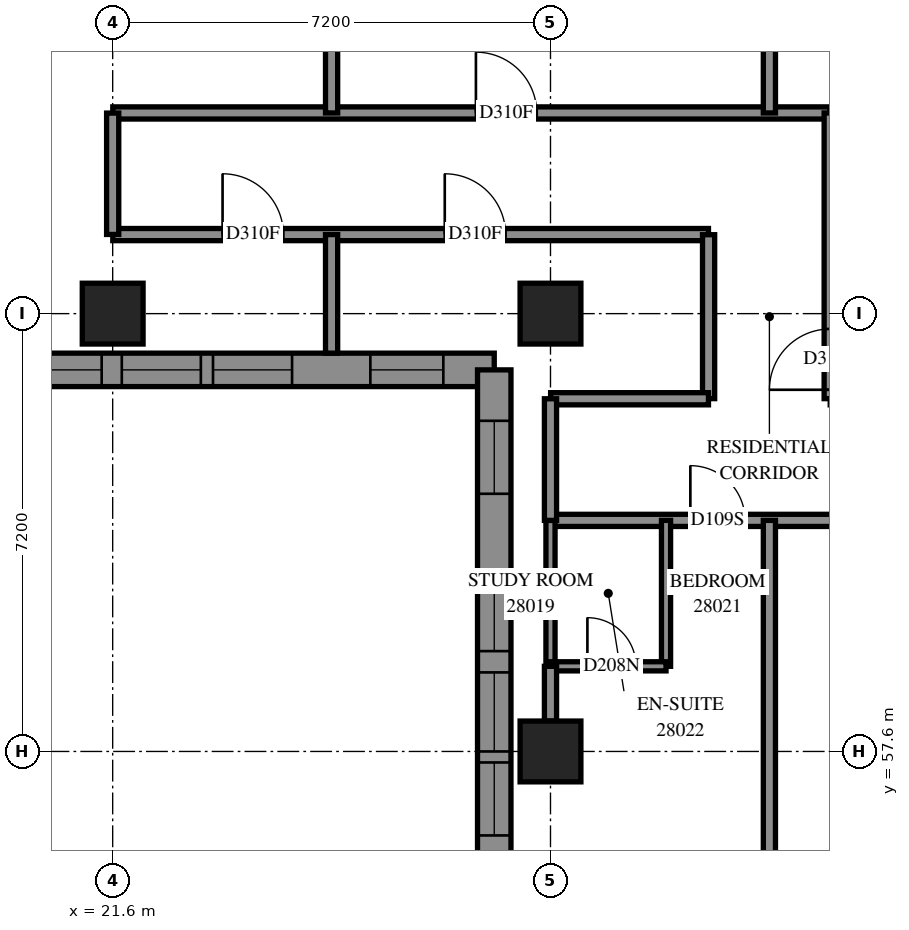
"""IFC4 building model, lengths in metres.
Left out: names, types, materials, properties, quantities, classifications, styles, units other than length and angle.
Written with IfcOpenShell. Run it as: python <this file> out.ifc"""

import sys

from ifc_helpers import new_model, si_unit, direction, frame, frame_2d, origin, origin_2d, place, context, subcontext, project, spatial, polyline, rectangle, outline, extrude, element, fill, save


model = new_model("IFC4")
c1 = context("Model", 3, precision=1e-05, world=origin(), true_north=direction((0.0, 1.0)))
c2 = subcontext(c1, "Body", "Model", "MODEL_VIEW")
j1 = project(units=[si_unit("LENGTHUNIT", "METRE"), si_unit("PLANEANGLEUNIT", "RADIAN")], contexts=[c1])
p1 = place(None, origin())
s1 = spatial("IfcSite", under=j1, at=p1, CompositionType="ELEMENT")
p2 = place(p1, origin())
s2 = spatial("IfcBuilding", under=s1, at=p2, CompositionType="ELEMENT")
p3 = place(p2, frame((0.0, 0.0, 105.0)))
s3 = spatial("IfcBuildingStorey", under=s2, at=p3, CompositionType="ELEMENT", Elevation=105.0)
for number, where, z_axis, x_axis in (
    (1, (21.6, 64.8, 0.0), (0.0, 0.0, 1.0), (1.0, 0.0, 0.0)),
    (2, (28.8, 57.6, 0.0), (0.0, 0.0, 1.0), (1.0, 0.0, 0.0)),
    (3, (28.8, 64.8, 0.0), (0.0, 0.0, 1.0), (1.0, 0.0, 0.0)),
):
    element("IfcColumn", number, at=place(p3, frame(where, z_axis=z_axis, x_axis=x_axis)), inside=s3, PredefinedType="COLUMN", context=c2, shape_type="SweptSolid", body=[
        extrude(rectangle(XDim=1.0, YDim=1.0, at=origin_2d()), origin(), (0.0, 0.0, 1.0), 3.1),
    ])
p4 = place(p3, frame((19.563, 63.875, 0.0), z_axis=(0.0, 0.0, 1.0), x_axis=(1.0, 0.0, 0.0)))
e4 = element("IfcWall", 4, at=p4, inside=s3, PredefinedType="SOLIDWALL", context=c2, shape_type="SweptSolid", body=[
    extrude(outline(polyline([(-0.275, -0.275), (8.037, -0.275), (8.587, 0.275), (0.275, 0.275), (-0.275, -0.275)])), origin(), (0.0, 0.0, 1.0), 3.1),
])
p5 = place(p4, frame((2.187, 0.0, 0.5)))
e5 = element("IfcOpeningElement", 5, at=p5, cuts=e4, PredefinedType="OPENING", context=c2, shape_type="SweptSolid", body=[
    extrude(rectangle(XDim=1.3, YDim=2.45, at=frame_2d((0.65, 1.225))), frame((0.0, 0.285, 0.0), z_axis=(0.0, -1.0, 0.0), x_axis=(1.0, 0.0, 0.0)), (0.0, 0.0, 1.0), 0.57),
])
p6 = place(p4, frame((3.687, 0.0, 0.5)))
e6 = element("IfcOpeningElement", 6, at=p6, cuts=e4, PredefinedType="OPENING", context=c2, shape_type="SweptSolid", body=[
    extrude(rectangle(XDim=1.3, YDim=2.45, at=frame_2d((0.65, 1.225))), frame((0.0, 0.285, 0.0), z_axis=(0.0, -1.0, 0.0), x_axis=(1.0, 0.0, 0.0)), (0.0, 0.0, 1.0), 0.57),
])
p7 = place(p4, frame((0.656, 0.0, 0.5)))
e7 = element("IfcOpeningElement", 7, at=p7, cuts=e4, PredefinedType="OPENING", context=c2, shape_type="SweptSolid", body=[
    extrude(rectangle(XDim=1.2, YDim=2.45, at=frame_2d((0.6, 1.225))), frame((0.0, 0.285, 0.0), z_axis=(0.0, -1.0, 0.0), x_axis=(1.0, 0.0, 0.0)), (0.0, 0.0, 1.0), 0.57),
])
p8 = place(p4, frame((6.274, 0.0, 0.5)))
e8 = element("IfcOpeningElement", 8, at=p8, cuts=e4, PredefinedType="OPENING", context=c2, shape_type="SweptSolid", body=[
    extrude(rectangle(XDim=1.2, YDim=2.45, at=frame_2d((0.6, 1.225))), frame((0.0, 0.285, 0.0), z_axis=(0.0, -1.0, 0.0), x_axis=(1.0, 0.0, 0.0)), (0.0, 0.0, 1.0), 0.57),
])
p9 = place(p3, frame((27.875, 63.875, 0.0), z_axis=(0.0, 0.0, 1.0), x_axis=(0.0, -1.0, 0.0)))
e9 = element("IfcWall", 9, at=p9, inside=s3, PredefinedType="SOLIDWALL", context=c2, shape_type="SweptSolid", body=[
    extrude(outline(polyline([(0.275, -0.275), (8.587, -0.275), (8.037, 0.275), (-0.275, 0.275), (0.275, -0.275)])), origin(), (0.0, 0.0, 1.0), 3.1),
])
p10 = place(p9, frame((3.325, 0.0, 0.5)))
e10 = element("IfcOpeningElement", 10, at=p10, cuts=e9, PredefinedType="OPENING", context=c2, shape_type="SweptSolid", body=[
    extrude(rectangle(XDim=1.3, YDim=2.45, at=frame_2d((0.65, 1.225))), frame((0.0, 0.285, 0.0), z_axis=(0.0, -1.0, 0.0), x_axis=(1.0, 0.0, 0.0)), (0.0, 0.0, 1.0), 0.57),
])
p11 = place(p9, frame((4.975, 0.0, 0.5)))
e11 = element("IfcOpeningElement", 11, at=p11, cuts=e9, PredefinedType="OPENING", context=c2, shape_type="SweptSolid", body=[
    extrude(rectangle(XDim=1.3, YDim=2.45, at=frame_2d((0.65, 1.225))), frame((0.0, 0.285, 0.0), z_axis=(0.0, -1.0, 0.0), x_axis=(1.0, 0.0, 0.0)), (0.0, 0.0, 1.0), 0.57),
])
p12 = place(p9, frame((0.838, 0.0, 0.5)))
e12 = element("IfcOpeningElement", 12, at=p12, cuts=e9, PredefinedType="OPENING", context=c2, shape_type="SweptSolid", body=[
    extrude(rectangle(XDim=1.2, YDim=2.45, at=frame_2d((0.6, 1.225))), frame((0.0, 0.285, 0.0), z_axis=(0.0, -1.0, 0.0), x_axis=(1.0, 0.0, 0.0)), (0.0, 0.0, 1.0), 0.57),
])
p13 = place(p9, frame((6.456, 0.0, 0.5)))
e13 = element("IfcOpeningElement", 13, at=p13, cuts=e9, PredefinedType="OPENING", context=c2, shape_type="SweptSolid", body=[
    extrude(rectangle(XDim=1.2, YDim=2.45, at=frame_2d((0.6, 1.225))), frame((0.0, 0.285, 0.0), z_axis=(0.0, -1.0, 0.0), x_axis=(1.0, 0.0, 0.0)), (0.0, 0.0, 1.0), 0.57),
])
p14 = place(p3, frame((28.8, 61.4, 0.0), z_axis=(0.0, 0.0, 1.0), x_axis=(1.0, 0.0, 0.0)))
e14 = element("IfcWall", 14, at=p14, inside=s3, PredefinedType="PARTITIONING", context=c2, shape_type="SweptSolid", body=[
    extrude(rectangle(XDim=24.2, YDim=0.2, at=frame_2d((12.1, 0.0))), origin(), (0.0, 0.0, 1.0), 3.1),
])
p15 = place(p14, frame((2.3, 0.0, 0.0)))
e15 = element("IfcOpeningElement", 15, at=p15, cuts=e14, PredefinedType="OPENING", context=c2, shape_type="SweptSolid", body=[
    extrude(rectangle(XDim=0.9, YDim=2.1, at=frame_2d((0.45, 1.05))), frame((0.0, 0.11, 0.0), z_axis=(0.0, -1.0, 0.0), x_axis=(1.0, 0.0, 0.0)), (0.0, 0.0, 1.0), 0.22),
])
p16 = place(p14, frame((5.901, 0.0, 0.0)))
e16 = element("IfcOpeningElement", 16, at=p16, cuts=e14, PredefinedType="OPENING", context=c2, shape_type="SweptSolid", body=[
    extrude(rectangle(XDim=0.9, YDim=2.1, at=frame_2d((0.45, 1.05))), frame((0.0, 0.11, 0.0), z_axis=(0.0, -1.0, 0.0), x_axis=(1.0, 0.0, 0.0)), (0.0, 0.0, 1.0), 0.22),
])
p17 = place(p14, frame((11.307, 0.0, 0.0)))
e17 = element("IfcOpeningElement", 17, at=p17, cuts=e14, PredefinedType="OPENING", context=c2, shape_type="SweptSolid", body=[
    extrude(rectangle(XDim=1.0, YDim=2.1, at=frame_2d((0.5, 1.05))), frame((0.0, 0.11, 0.0), z_axis=(0.0, -1.0, 0.0), x_axis=(1.0, 0.0, 0.0)), (0.0, 0.0, 1.0), 0.22),
])
p18 = place(p14, frame((16.7, 0.0, 0.0)))
e18 = element("IfcOpeningElement", 18, at=p18, cuts=e14, PredefinedType="OPENING", context=c2, shape_type="SweptSolid", body=[
    extrude(rectangle(XDim=0.9, YDim=2.1, at=frame_2d((0.45, 1.05))), frame((0.0, 0.11, 0.0), z_axis=(0.0, -1.0, 0.0), x_axis=(1.0, 0.0, 0.0)), (0.0, 0.0, 1.0), 0.22),
])
p19 = place(p14, frame((18.508, 0.0, 0.0)))
e19 = element("IfcOpeningElement", 19, at=p19, cuts=e14, PredefinedType="OPENING", context=c2, shape_type="SweptSolid", body=[
    extrude(rectangle(XDim=1.0, YDim=2.1, at=frame_2d((0.5, 1.05))), frame((0.0, 0.11, 0.0), z_axis=(0.0, -1.0, 0.0), x_axis=(1.0, 0.0, 0.0)), (0.0, 0.0, 1.0), 0.22),
])
p20 = place(p14, frame((23.074, 0.0, 0.0)))
e20 = element("IfcOpeningElement", 20, at=p20, cuts=e14, PredefinedType="OPENING", context=c2, shape_type="SweptSolid", body=[
    extrude(rectangle(XDim=1.0, YDim=2.1, at=frame_2d((0.5, 1.05))), frame((0.0, 0.11, 0.0), z_axis=(0.0, -1.0, 0.0), x_axis=(1.0, 0.0, 0.0)), (0.0, 0.0, 1.0), 0.22),
])
p21 = place(p3, frame((21.602, 68.1, 0.0), z_axis=(0.0, 0.0, 1.0), x_axis=(1.0, 0.0, 0.0)))
e21 = element("IfcWall", 21, at=p21, inside=s3, PredefinedType="PARTITIONING", context=c2, shape_type="SweptSolid", body=[
    extrude(rectangle(XDim=11.798, YDim=0.2, at=frame_2d((5.899, 0.0))), origin(), (0.0, 0.0, 1.0), 3.1),
])
p22 = place(p21, frame((5.972, 0.0, 0.0)))
e22 = element("IfcOpeningElement", 22, at=p22, cuts=e21, PredefinedType="OPENING", context=c2, shape_type="SweptSolid", body=[
    extrude(rectangle(XDim=1.0, YDim=2.1, at=frame_2d((0.5, 1.05))), frame((0.0, 0.11, 0.0), z_axis=(0.0, -1.0, 0.0), x_axis=(1.0, 0.0, 0.0)), (0.0, 0.0, 1.0), 0.22),
])
p23 = place(p3, frame((21.602, 66.1, 0.0), z_axis=(0.0, 0.0, 1.0), x_axis=(1.0, 0.0, 0.0)))
e23 = element("IfcWall", 23, at=p23, inside=s3, PredefinedType="PARTITIONING", context=c2, shape_type="SweptSolid", body=[
    extrude(rectangle(XDim=9.796, YDim=0.2, at=frame_2d((4.898, 0.0))), origin(), (0.0, 0.0, 1.0), 3.1),
])
p24 = place(p23, frame((1.805, 0.0, 0.0)))
e24 = element("IfcOpeningElement", 24, at=p24, cuts=e23, PredefinedType="OPENING", context=c2, shape_type="SweptSolid", body=[
    extrude(rectangle(XDim=1.0, YDim=2.1, at=frame_2d((0.5, 1.05))), frame((0.0, 0.11, 0.0), z_axis=(0.0, -1.0, 0.0), x_axis=(1.0, 0.0, 0.0)), (0.0, 0.0, 1.0), 0.22),
])
p25 = place(p23, frame((5.459, 0.0, 0.0)))
e25 = element("IfcOpeningElement", 25, at=p25, cuts=e23, PredefinedType="OPENING", context=c2, shape_type="SweptSolid", body=[
    extrude(rectangle(XDim=1.0, YDim=2.1, at=frame_2d((0.5, 1.05))), frame((0.0, 0.11, 0.0), z_axis=(0.0, -1.0, 0.0), x_axis=(1.0, 0.0, 0.0)), (0.0, 0.0, 1.0), 0.22),
])
p26 = place(p3, frame((32.4, 55.838, 0.0), z_axis=(0.0, 0.0, 1.0), x_axis=(0.0, 1.0, 0.0)))
e26 = element("IfcWall", 26, at=p26, inside=s3, PredefinedType="PARTITIONING", context=c2, shape_type="SweptSolid", body=[
    extrude(rectangle(XDim=5.562, YDim=0.2, at=frame_2d((2.781, 0.0))), origin(), (0.0, 0.0, 1.0), 3.1),
])
p27 = place(p3, frame((25.2, 68.1, 0.0), z_axis=(0.0, 0.0, 1.0), x_axis=(0.0, 1.0, 0.0)))
e27 = element("IfcWall", 27, at=p27, inside=s3, PredefinedType="PARTITIONING", context=c2, shape_type="SweptSolid", body=[
    extrude(rectangle(XDim=4.829, YDim=0.2, at=frame_2d((2.414, 0.0))), origin(), (0.0, 0.0, 1.0), 3.1),
])
p28 = place(p3, frame((32.4, 68.1, 0.0), z_axis=(0.0, 0.0, 1.0), x_axis=(0.0, 1.0, 0.0)))
e28 = element("IfcWall", 28, at=p28, inside=s3, PredefinedType="PARTITIONING", context=c2, shape_type="SweptSolid", body=[
    extrude(rectangle(XDim=4.774, YDim=0.2, at=frame_2d((2.387, 0.0))), origin(), (0.0, 0.0, 1.0), 3.1),
])
p29 = place(p3, frame((33.4, 63.402, 0.0), z_axis=(0.0, 0.0, 1.0), x_axis=(0.0, 1.0, 0.0)))
e29 = element("IfcWall", 29, at=p29, inside=s3, PredefinedType="PARTITIONING", context=c2, shape_type="SweptSolid", body=[
    extrude(rectangle(XDim=4.698, YDim=0.2, at=frame_2d((2.349, 0.0))), origin(), (0.0, 0.0, 1.0), 3.1),
])
p30 = place(p29, frame((0.146, 0.0, 0.0)))
e30 = element("IfcOpeningElement", 30, at=p30, cuts=e29, PredefinedType="OPENING", context=c2, shape_type="SweptSolid", body=[
    extrude(rectangle(XDim=1.0, YDim=2.1, at=frame_2d((0.5, 1.05))), frame((0.0, 0.11, 0.0), z_axis=(0.0, -1.0, 0.0), x_axis=(1.0, 0.0, 0.0)), (0.0, 0.0, 1.0), 0.22),
])
p31 = place(p3, frame((31.4, 63.402, 0.0), z_axis=(0.0, 0.0, 1.0), x_axis=(0.0, 1.0, 0.0)))
e31 = element("IfcWall", 31, at=p31, inside=s3, PredefinedType="PARTITIONING", context=c2, shape_type="SweptSolid", body=[
    extrude(rectangle(XDim=2.696, YDim=0.2, at=frame_2d((1.348, 0.0))), origin(), (0.0, 0.0, 1.0), 3.1),
])
p32 = place(p3, frame((28.802, 63.4, 0.0), z_axis=(0.0, 0.0, 1.0), x_axis=(1.0, 0.0, 0.0)))
e32 = element("IfcWall", 32, at=p32, inside=s3, PredefinedType="PARTITIONING", context=c2, shape_type="SweptSolid", body=[
    extrude(rectangle(XDim=2.596, YDim=0.2, at=frame_2d((1.298, 0.0))), origin(), (0.0, 0.0, 1.0), 3.1),
])
p33 = place(p3, frame((30.7, 59.0, 0.0), z_axis=(0.0, 0.0, 1.0), x_axis=(0.0, 1.0, 0.0)))
e33 = element("IfcWall", 33, at=p33, inside=s3, PredefinedType="PARTITIONING", context=c2, shape_type="SweptSolid", body=[
    extrude(rectangle(XDim=2.4, YDim=0.15, at=frame_2d((1.2, 0.0))), origin(), (0.0, 0.0, 1.0), 3.1),
])
p34 = place(p3, frame((28.8, 59.0, 0.0), z_axis=(0.0, 0.0, 1.0), x_axis=(0.0, 1.0, 0.0)))
e34 = element("IfcWall", 34, at=p34, inside=s3, PredefinedType="PARTITIONING", context=c2, shape_type="SweptSolid", body=[
    extrude(rectangle(XDim=2.4, YDim=0.15, at=frame_2d((1.2, 0.0))), origin(), (0.0, 0.0, 1.0), 2.6),
])
p35 = place(p3, frame((28.8, 61.4, 0.0), z_axis=(0.0, 0.0, 1.0), x_axis=(0.0, 1.0, 0.0)))
e35 = element("IfcWall", 35, at=p35, inside=s3, PredefinedType="PARTITIONING", context=c2, shape_type="SweptSolid", body=[
    extrude(rectangle(XDim=2.0, YDim=0.2, at=frame_2d((1.0, 0.0))), origin(), (0.0, 0.0, 1.0), 2.6),
])
p36 = place(p3, frame((21.6, 66.102, 0.0), z_axis=(0.0, 0.0, 1.0), x_axis=(0.0, 1.0, 0.0)))
e36 = element("IfcWall", 36, at=p36, inside=s3, PredefinedType="PARTITIONING", context=c2, shape_type="SweptSolid", body=[
    extrude(rectangle(XDim=1.996, YDim=0.2, at=frame_2d((0.998, 0.0))), origin(), (0.0, 0.0, 1.0), 2.6),
])
p37 = place(p3, frame((28.8, 59.0, 0.0), z_axis=(0.0, 0.0, 1.0), x_axis=(1.0, 0.0, 0.0)))
e37 = element("IfcWall", 37, at=p37, inside=s3, PredefinedType="PARTITIONING", context=c2, shape_type="SweptSolid", body=[
    extrude(rectangle(XDim=1.9, YDim=0.15, at=frame_2d((0.95, 0.0))), origin(), (0.0, 0.0, 1.0), 3.1),
])
p38 = place(p37, frame((0.607, 0.0, 0.0)))
e38 = element("IfcOpeningElement", 38, at=p38, cuts=e37, PredefinedType="OPENING", context=c2, shape_type="SweptSolid", body=[
    extrude(rectangle(XDim=0.8, YDim=2.1, at=frame_2d((0.4, 1.05))), frame((0.0, 0.085, 0.0), z_axis=(0.0, -1.0, 0.0), x_axis=(1.0, 0.0, 0.0)), (0.0, 0.0, 1.0), 0.17),
])
p39 = place(p3, frame((25.2, 64.15, 0.0), z_axis=(0.0, 0.0, 1.0), x_axis=(0.0, 1.0, 0.0)))
e39 = element("IfcWall", 39, at=p39, inside=s3, PredefinedType="PARTITIONING", context=c2, shape_type="SweptSolid", body=[
    extrude(rectangle(XDim=1.95, YDim=0.2, at=frame_2d((0.975, 0.0))), origin(), (0.0, 0.0, 1.0), 3.1),
])
p40 = place(p3, frame((28.8, 58.1, 0.0), z_axis=(0.0, 0.0, 1.0), x_axis=(0.0, 1.0, 0.0)))
e40 = element("IfcWall", 40, at=p40, inside=s3, PredefinedType="PARTITIONING", context=c2, shape_type="SweptSolid", body=[
    extrude(rectangle(XDim=0.9, YDim=0.2, at=frame_2d((0.45, 0.0))), origin(), (0.0, 0.0, 1.0), 2.6),
])
p41 = place(p5, origin())
e41 = element("IfcWindow", 41, at=p41, inside=s3, PartitioningType="SINGLE_PANEL", PredefinedType="WINDOW", context=c2, shape_type="SweptSolid", body=[
    extrude(rectangle(XDim=1.3, YDim=2.45, at=frame_2d((0.65, 1.225))), frame((0.0, 0.155, 0.0), z_axis=(0.0, -1.0, 0.0), x_axis=(1.0, 0.0, 0.0)), (0.0, 0.0, 1.0), 0.06),
])
fill(e5, e41)
p42 = place(p6, origin())
e42 = element("IfcWindow", 42, at=p42, inside=s3, PartitioningType="SINGLE_PANEL", PredefinedType="WINDOW", context=c2, shape_type="SweptSolid", body=[
    extrude(rectangle(XDim=1.3, YDim=2.45, at=frame_2d((0.65, 1.225))), frame((0.0, 0.155, 0.0), z_axis=(0.0, -1.0, 0.0), x_axis=(1.0, 0.0, 0.0)), (0.0, 0.0, 1.0), 0.06),
])
fill(e6, e42)
p43 = place(p7, origin())
e43 = element("IfcWindow", 43, at=p43, inside=s3, PartitioningType="SINGLE_PANEL", PredefinedType="WINDOW", context=c2, shape_type="SweptSolid", body=[
    extrude(rectangle(XDim=1.2, YDim=2.45, at=frame_2d((0.6, 1.225))), frame((0.0, 0.155, 0.0), z_axis=(0.0, -1.0, 0.0), x_axis=(1.0, 0.0, 0.0)), (0.0, 0.0, 1.0), 0.06),
])
fill(e7, e43)
p44 = place(p8, origin())
e44 = element("IfcWindow", 44, at=p44, inside=s3, PartitioningType="SINGLE_PANEL", PredefinedType="WINDOW", context=c2, shape_type="SweptSolid", body=[
    extrude(rectangle(XDim=1.2, YDim=2.45, at=frame_2d((0.6, 1.225))), frame((0.0, 0.155, 0.0), z_axis=(0.0, -1.0, 0.0), x_axis=(1.0, 0.0, 0.0)), (0.0, 0.0, 1.0), 0.06),
])
fill(e8, e44)
p45 = place(p10, origin())
e45 = element("IfcWindow", 45, at=p45, inside=s3, PartitioningType="SINGLE_PANEL", PredefinedType="WINDOW", context=c2, shape_type="SweptSolid", body=[
    extrude(rectangle(XDim=1.3, YDim=2.45, at=frame_2d((0.65, 1.225))), frame((0.0, 0.155, 0.0), z_axis=(0.0, -1.0, 0.0), x_axis=(1.0, 0.0, 0.0)), (0.0, 0.0, 1.0), 0.06),
])
fill(e10, e45)
p46 = place(p11, origin())
e46 = element("IfcWindow", 46, at=p46, inside=s3, PartitioningType="SINGLE_PANEL", PredefinedType="WINDOW", context=c2, shape_type="SweptSolid", body=[
    extrude(rectangle(XDim=1.3, YDim=2.45, at=frame_2d((0.65, 1.225))), frame((0.0, 0.155, 0.0), z_axis=(0.0, -1.0, 0.0), x_axis=(1.0, 0.0, 0.0)), (0.0, 0.0, 1.0), 0.06),
])
fill(e11, e46)
p47 = place(p12, origin())
e47 = element("IfcWindow", 47, at=p47, inside=s3, PartitioningType="SINGLE_PANEL", PredefinedType="WINDOW", context=c2, shape_type="SweptSolid", body=[
    extrude(rectangle(XDim=1.2, YDim=2.45, at=frame_2d((0.6, 1.225))), frame((0.0, 0.155, 0.0), z_axis=(0.0, -1.0, 0.0), x_axis=(1.0, 0.0, 0.0)), (0.0, 0.0, 1.0), 0.06),
])
fill(e12, e47)
p48 = place(p13, origin())
e48 = element("IfcWindow", 48, at=p48, inside=s3, PartitioningType="SINGLE_PANEL", PredefinedType="WINDOW", context=c2, shape_type="SweptSolid", body=[
    extrude(rectangle(XDim=1.2, YDim=2.45, at=frame_2d((0.6, 1.225))), frame((0.0, 0.155, 0.0), z_axis=(0.0, -1.0, 0.0), x_axis=(1.0, 0.0, 0.0)), (0.0, 0.0, 1.0), 0.06),
])
fill(e13, e48)
p49 = place(p24, origin())
e49 = element("IfcDoor", 49, at=p49, inside=s3, OperationType="SINGLE_SWING_RIGHT", PredefinedType="DOOR", context=c2, shape_type="SweptSolid", body=[
    extrude(rectangle(XDim=1.0, YDim=2.1, at=frame_2d((0.5, 1.05))), frame((0.0, 0.025, 0.0), z_axis=(0.0, -1.0, 0.0), x_axis=(1.0, 0.0, 0.0)), (0.0, 0.0, 1.0), 0.05),
])
fill(e24, e49)
p50 = place(p25, origin())
e50 = element("IfcDoor", 50, at=p50, inside=s3, OperationType="SINGLE_SWING_RIGHT", PredefinedType="DOOR", context=c2, shape_type="SweptSolid", body=[
    extrude(rectangle(XDim=1.0, YDim=2.1, at=frame_2d((0.5, 1.05))), frame((0.0, 0.025, 0.0), z_axis=(0.0, -1.0, 0.0), x_axis=(1.0, 0.0, 0.0)), (0.0, 0.0, 1.0), 0.05),
])
fill(e25, e50)
p51 = place(p22, origin())
e51 = element("IfcDoor", 51, at=p51, inside=s3, OperationType="SINGLE_SWING_LEFT", PredefinedType="DOOR", context=c2, shape_type="SweptSolid", body=[
    extrude(rectangle(XDim=1.0, YDim=2.1, at=frame_2d((0.5, 1.05))), frame((0.0, 0.025, 0.0), z_axis=(0.0, -1.0, 0.0), x_axis=(1.0, 0.0, 0.0)), (0.0, 0.0, 1.0), 0.05),
])
fill(e22, e51)
p52 = place(p15, origin())
e52 = element("IfcDoor", 52, at=p52, inside=s3, OperationType="SINGLE_SWING_LEFT", PredefinedType="DOOR", context=c2, shape_type="SweptSolid", body=[
    extrude(rectangle(XDim=0.9, YDim=2.1, at=frame_2d((0.45, 1.05))), frame((0.0, 0.025, 0.0), z_axis=(0.0, -1.0, 0.0), x_axis=(1.0, 0.0, 0.0)), (0.0, 0.0, 1.0), 0.05),
])
fill(e15, e52)
p53 = place(p38, origin())
e53 = element("IfcDoor", 53, at=p53, inside=s3, OperationType="SINGLE_SWING_RIGHT", PredefinedType="DOOR", context=c2, shape_type="SweptSolid", body=[
    extrude(rectangle(XDim=0.8, YDim=2.1, at=frame_2d((0.4, 1.05))), frame((0.0, 0.025, 0.0), z_axis=(0.0, -1.0, 0.0), x_axis=(1.0, 0.0, 0.0)), (0.0, 0.0, 1.0), 0.05),
])
fill(e38, e53)
p54 = place(p30, origin())
e54 = element("IfcDoor", 54, at=p54, inside=s3, OperationType="SINGLE_SWING_LEFT", PredefinedType="DOOR", context=c2, shape_type="SweptSolid", body=[
    extrude(rectangle(XDim=1.0, YDim=2.1, at=frame_2d((0.5, 1.05))), frame((0.0, 0.025, 0.0), z_axis=(0.0, -1.0, 0.0), x_axis=(1.0, 0.0, 0.0)), (0.0, 0.0, 1.0), 0.05),
])
fill(e30, e54)
save(model, sys.argv[1])
